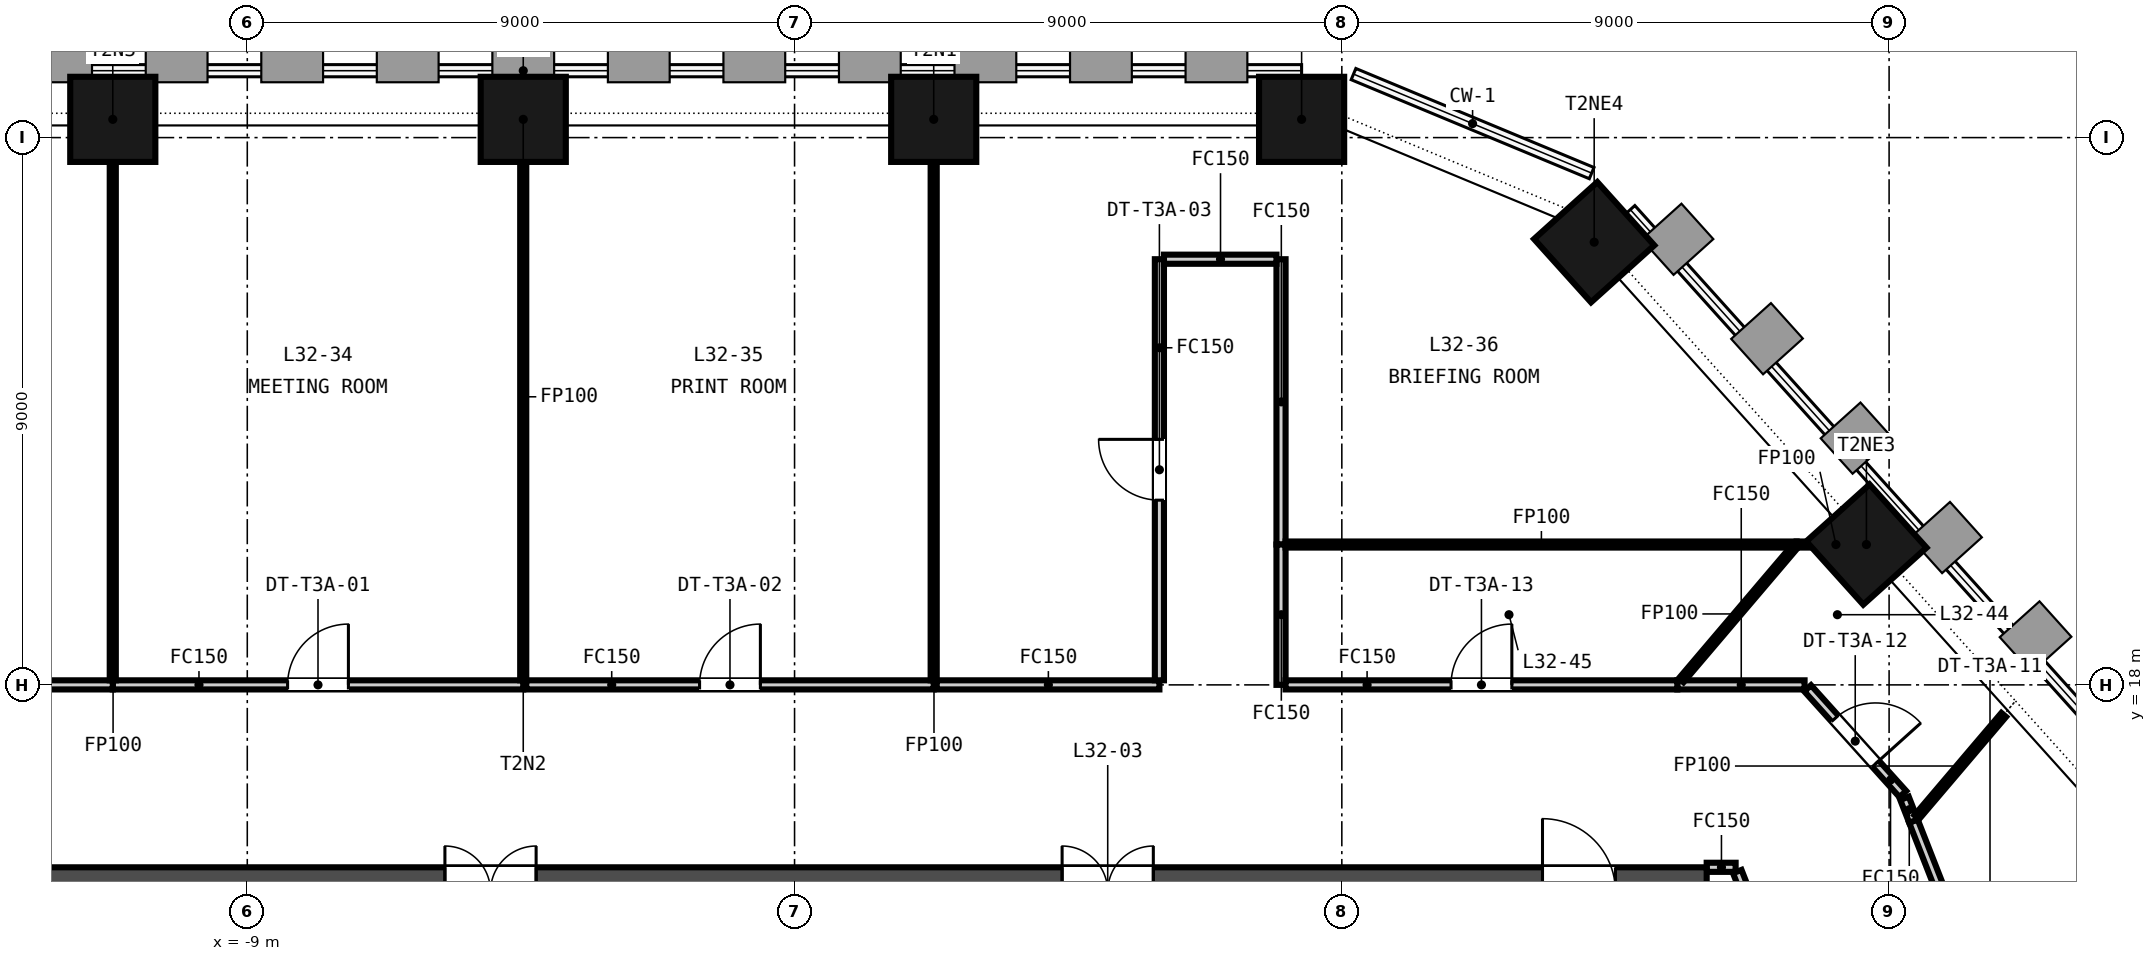
"""IFC4 building model, lengths in metres.
Left out: names, types, materials, properties, quantities, classifications, styles, units other than length and angle.
Written with IfcOpenShell. Run it as: python <this file> out.ifc"""

import sys

from ifc_helpers import new_model, si_unit, direction, frame, frame_2d, origin, origin_2d, place, context, subcontext, project, spatial, rectangle, extrude, element, fill, save


model = new_model("IFC4")
c1 = context("Model", 3, precision=1e-05, world=origin(), true_north=direction((0.0, 1.0)))
c2 = subcontext(c1, "Body", "Model", "MODEL_VIEW")
j1 = project(units=[si_unit("LENGTHUNIT", "METRE"), si_unit("PLANEANGLEUNIT", "RADIAN")], contexts=[c1])
p1 = place(None, origin())
s1 = spatial("IfcSite", under=j1, at=p1, CompositionType="ELEMENT")
p2 = place(p1, origin())
s2 = spatial("IfcBuilding", under=s1, at=p2, CompositionType="ELEMENT")
p3 = place(p2, frame((0.0, 0.0, 133.45)))
s3 = spatial("IfcBuildingStorey", under=s2, at=p3, CompositionType="ELEMENT", Elevation=133.45)
p4 = place(p3, frame((-15.0, 14.6, -0.15), z_axis=(0.0, 0.0, 1.0), x_axis=(1.0, 0.0, 0.0)))
e1 = element("IfcWall", 1, at=p4, inside=s3, PredefinedType="SOLIDWALL", context=c2, shape_type="SweptSolid", body=[
    extrude(rectangle(XDim=30.0, YDim=0.8, at=frame_2d((15.0, 0.0))), origin(), (0.0, 0.0, 1.0), 3.65),
])
p5 = place(p4, frame((9.25, 0.0, 0.15)))
e2 = element("IfcOpeningElement", 2, at=p5, cuts=e1, PredefinedType="OPENING", context=c2, shape_type="SweptSolid", body=[
    extrude(rectangle(XDim=1.5, YDim=2.1, at=frame_2d((0.75, 1.05))), frame((0.0, 0.41, 0.0), z_axis=(0.0, -1.0, 0.0), x_axis=(1.0, 0.0, 0.0)), (0.0, 0.0, 1.0), 0.82),
])
p6 = place(p4, frame((19.4, 0.0, 0.15)))
e3 = element("IfcOpeningElement", 3, at=p6, cuts=e1, PredefinedType="OPENING", context=c2, shape_type="SweptSolid", body=[
    extrude(rectangle(XDim=1.5, YDim=2.1, at=frame_2d((0.75, 1.05))), frame((0.0, 0.41, 0.0), z_axis=(0.0, -1.0, 0.0), x_axis=(1.0, 0.0, 0.0)), (0.0, 0.0, 1.0), 0.82),
])
p7 = place(p4, frame((1.5, 0.0, 0.15)))
e4 = element("IfcOpeningElement", 4, at=p7, cuts=e1, PredefinedType="OPENING", context=c2, shape_type="SweptSolid", body=[
    extrude(rectangle(XDim=1.2, YDim=2.1, at=frame_2d((0.6, 1.05))), frame((0.0, 0.41, 0.0), z_axis=(0.0, -1.0, 0.0), x_axis=(1.0, 0.0, 0.0)), (0.0, 0.0, 1.0), 0.82),
])
p8 = place(p4, frame((27.3, 0.0, 0.15)))
e5 = element("IfcOpeningElement", 5, at=p8, cuts=e1, PredefinedType="OPENING", context=c2, shape_type="SweptSolid", body=[
    extrude(rectangle(XDim=1.2, YDim=2.1, at=frame_2d((0.6, 1.05))), frame((0.0, 0.41, 0.0), z_axis=(0.0, -1.0, 0.0), x_axis=(1.0, 0.0, 0.0)), (0.0, 0.0, 1.0), 0.82),
])
for number, where, z_axis, x_axis in (
    (6, (8.339, 27.3, -0.15), (0.0, 0.0, 1.0), (-1.0, 0.0, 0.0)),
    (7, (2.288, 27.3, -0.15), (0.0, 0.0, 1.0), (-1.0, 0.0, 0.0)),
    (8, (-4.462, 27.3, -0.15), (0.0, 0.0, 1.0), (-1.0, 0.0, 0.0)),
    (9, (-11.212, 27.3, -0.15), (0.0, 0.0, 1.0), (-1.0, 0.0, 0.0)),
    (10, (17.627, 20.308, -0.15), (0.0, 0.0, 1.0), (-0.669, 0.743, 0.0)),
    (11, (13.15, 25.28, -0.15), (0.0, 0.0, 1.0), (-0.669, 0.743, 0.0)),
):
    element("IfcColumn", number, at=place(p3, frame(where, z_axis=z_axis, x_axis=x_axis)), inside=s3, PredefinedType="COLUMN", context=c2, shape_type="SweptSolid", body=[
        extrude(rectangle(XDim=1.4, YDim=1.4, at=origin_2d()), origin(), (0.0, 0.0, 1.0), 3.65),
    ])
p9 = place(p3, frame((8.0, 25.0, 0.0), z_axis=(0.0, 0.0, 1.0), x_axis=(0.0, -1.0, 0.0)))
e12 = element("IfcWall", 12, at=p9, inside=s3, PredefinedType="PARTITIONING", context=c2, shape_type="SweptSolid", body=[
    extrude(rectangle(XDim=4.692, YDim=0.15, at=frame_2d((2.346, 0.0))), origin(), (0.0, 0.0, 1.0), 2.741),
])
p10 = place(p3, frame((15.476, 15.0, 0.0), z_axis=(0.0, 0.0, 1.0), x_axis=(-1.0, 0.0, 0.0)))
e13 = element("IfcWall", 13, at=p10, inside=s3, PredefinedType="PARTITIONING", context=c2, shape_type="SweptSolid", body=[
    extrude(rectangle(XDim=0.476, YDim=0.15, at=frame_2d((0.238, 0.0))), origin(), (0.0, 0.0, 1.0), 2.741),
])
p11 = place(p3, frame((19.5, 4.717, 0.0), z_axis=(0.0, 0.0, 1.0), x_axis=(-0.364410260026, 0.931238509936, 0.0)))
e14 = element("IfcWall", 14, at=p11, inside=s3, PredefinedType="PARTITIONING", context=c2, shape_type="SweptSolid", body=[
    extrude(rectangle(XDim=10.967, YDim=0.15, at=frame_2d((5.484, 0.0))), origin(), (0.0, 0.0, 1.0), 2.741),
])
p12 = place(p11, frame((4.984, 0.0, 0.0)))
e15 = element("IfcOpeningElement", 15, at=p12, cuts=e14, PredefinedType="OPENING", context=c2, shape_type="SweptSolid", body=[
    extrude(rectangle(XDim=1.0, YDim=2.1, at=frame_2d((0.5, 1.05))), frame((0.0, 0.085, 0.0), z_axis=(0.0, -1.0, 0.0), x_axis=(1.0, 0.0, 0.0)), (0.0, 0.0, 1.0), 0.17),
])
p13 = place(p3, frame((8.0, 20.308, 0.0), z_axis=(0.0, 0.0, 1.0), x_axis=(0.0, -1.0, 0.0)))
e16 = element("IfcWall", 16, at=p13, inside=s3, PredefinedType="PARTITIONING", context=c2, shape_type="SweptSolid", body=[
    extrude(rectangle(XDim=2.308, YDim=0.15, at=frame_2d((1.154, 0.0))), origin(), (0.0, 0.0, 1.0), 2.741),
])
p14 = place(p3, frame((-11.212, 18.0, 0.0), z_axis=(0.0, 0.0, 1.0), x_axis=(1.0, 0.0, 0.0)))
e17 = element("IfcWall", 17, at=p14, inside=s3, PredefinedType="PARTITIONING", context=c2, shape_type="SweptSolid", body=[
    extrude(rectangle(XDim=6.75, YDim=0.15, at=frame_2d((3.375, 0.0))), origin(), (0.0, 0.0, 1.0), 2.741),
])
p15 = place(p14, frame((2.875, 0.0, 0.0)))
e18 = element("IfcOpeningElement", 18, at=p15, cuts=e17, PredefinedType="OPENING", context=c2, shape_type="SweptSolid", body=[
    extrude(rectangle(XDim=1.0, YDim=2.1, at=frame_2d((0.5, 1.05))), frame((0.0, 0.085, 0.0), z_axis=(0.0, -1.0, 0.0), x_axis=(1.0, 0.0, 0.0)), (0.0, 0.0, 1.0), 0.17),
])
p16 = place(p3, frame((-4.462, 18.075, 0.0), z_axis=(0.0, 0.0, 1.0), x_axis=(0.0, 1.0, 0.0)))
e19 = element("IfcWall", 19, at=p16, inside=s3, PredefinedType="PARTITIONING", context=c2, shape_type="SweptSolid", body=[
    extrude(rectangle(XDim=9.325, YDim=0.1, at=frame_2d((4.663, 0.0))), origin(), (0.0, 0.0, 1.0), 2.741),
])
p17 = place(p3, frame((-4.412, 18.0, 0.0), z_axis=(0.0, 0.0, 1.0), x_axis=(1.0, 0.0, 0.0)))
e20 = element("IfcWall", 20, at=p17, inside=s3, PredefinedType="PARTITIONING", context=c2, shape_type="SweptSolid", body=[
    extrude(rectangle(XDim=6.7, YDim=0.15, at=frame_2d((3.35, 0.0))), origin(), (0.0, 0.0, 1.0), 2.741),
])
p18 = place(p17, frame((2.85, 0.0, 0.0)))
e21 = element("IfcOpeningElement", 21, at=p18, cuts=e20, PredefinedType="OPENING", context=c2, shape_type="SweptSolid", body=[
    extrude(rectangle(XDim=1.0, YDim=2.1, at=frame_2d((0.5, 1.05))), frame((0.0, 0.085, 0.0), z_axis=(0.0, -1.0, 0.0), x_axis=(1.0, 0.0, 0.0)), (0.0, 0.0, 1.0), 0.17),
])
p19 = place(p3, frame((2.288, 18.075, 0.0), z_axis=(0.0, 0.0, 1.0), x_axis=(0.0, 1.0, 0.0)))
e22 = element("IfcWall", 22, at=p19, inside=s3, PredefinedType="PARTITIONING", context=c2, shape_type="SweptSolid", body=[
    extrude(rectangle(XDim=9.325, YDim=0.1, at=frame_2d((4.663, 0.0))), origin(), (0.0, 0.0, 1.0), 2.741),
])
p20 = place(p3, frame((2.338, 18.0, 0.0), z_axis=(0.0, 0.0, 1.0), x_axis=(1.0, 0.0, 0.0)))
e23 = element("IfcWall", 23, at=p20, inside=s3, PredefinedType="PARTITIONING", context=c2, shape_type="SweptSolid", body=[
    extrude(rectangle(XDim=3.662, YDim=0.15, at=frame_2d((1.831, 0.0))), origin(), (0.0, 0.0, 1.0), 2.741),
])
p21 = place(p3, frame((6.0, 18.075, 0.0), z_axis=(0.0, 0.0, 1.0), x_axis=(0.0, 1.0, 0.0)))
e24 = element("IfcWall", 24, at=p21, inside=s3, PredefinedType="PARTITIONING", context=c2, shape_type="SweptSolid", body=[
    extrude(rectangle(XDim=6.925, YDim=0.15, at=frame_2d((3.462, 0.0))), origin(), (0.0, 0.0, 1.0), 2.741),
])
p22 = place(p21, frame((2.962, 0.0, 0.0)))
e25 = element("IfcOpeningElement", 25, at=p22, cuts=e24, PredefinedType="OPENING", context=c2, shape_type="SweptSolid", body=[
    extrude(rectangle(XDim=1.0, YDim=2.1, at=frame_2d((0.5, 1.05))), frame((0.0, 0.085, 0.0), z_axis=(0.0, -1.0, 0.0), x_axis=(1.0, 0.0, 0.0)), (0.0, 0.0, 1.0), 0.17),
])
p23 = place(p3, frame((6.075, 25.0, 0.0), z_axis=(0.0, 0.0, 1.0), x_axis=(1.0, 0.0, 0.0)))
e26 = element("IfcWall", 26, at=p23, inside=s3, PredefinedType="PARTITIONING", context=c2, shape_type="SweptSolid", body=[
    extrude(rectangle(XDim=1.85, YDim=0.15, at=frame_2d((0.925, 0.0))), origin(), (0.0, 0.0, 1.0), 2.741),
])
p24 = place(p3, frame((16.479, 20.308, 0.0), z_axis=(0.0, 0.0, 1.0), x_axis=(1.0, 0.0, 0.0)))
e27 = element("IfcWall", 27, at=p24, inside=s3, PredefinedType="PARTITIONING", context=c2, shape_type="SweptSolid", body=[
    extrude(rectangle(XDim=1.283, YDim=0.1, at=frame_2d((0.642, 0.0))), origin(), (0.0, 0.0, 1.0), 2.741),
])
p25 = place(p3, frame((8.075, 20.308, 0.0), z_axis=(0.0, 0.0, 1.0), x_axis=(1.0, 0.0, 0.0)))
e28 = element("IfcWall", 28, at=p25, inside=s3, PredefinedType="PARTITIONING", context=c2, shape_type="SweptSolid", body=[
    extrude(rectangle(XDim=8.404, YDim=0.1, at=frame_2d((4.202, 0.0))), origin(), (0.0, 0.0, 1.0), 2.741),
])
p26 = place(p3, frame((-17.449, 18.0, 0.0), z_axis=(0.0, 0.0, 1.0), x_axis=(1.0, 0.0, 0.0)))
e29 = element("IfcWall", 29, at=p26, inside=s3, PredefinedType="PARTITIONING", context=c2, shape_type="SweptSolid", body=[
    extrude(rectangle(XDim=6.237, YDim=0.15, at=frame_2d((3.119, 0.0))), origin(), (0.0, 0.0, 1.0), 2.741),
])
p27 = place(p3, frame((-11.212, 18.075, 0.0), z_axis=(0.0, 0.0, 1.0), x_axis=(0.0, 1.0, 0.0)))
e30 = element("IfcWall", 30, at=p27, inside=s3, PredefinedType="PARTITIONING", context=c2, shape_type="SweptSolid", body=[
    extrude(rectangle(XDim=9.325, YDim=0.1, at=frame_2d((4.663, 0.0))), origin(), (0.0, 0.0, 1.0), 2.741),
])
p28 = place(p3, frame((18.4, 15.76, 0.0), z_axis=(0.0, 0.0, 1.0), x_axis=(0.364425982763, -0.931232357195, 0.0)))
e31 = element("IfcWall", 31, at=p28, inside=s3, PredefinedType="PARTITIONING", context=c2, shape_type="SweptSolid", body=[
    extrude(rectangle(XDim=6.912, YDim=0.15, at=frame_2d((3.456, 0.0))), origin(), (0.0, 0.0, 1.0), 2.741),
])
p29 = place(p28, frame((2.956, 0.0, 0.0)))
e32 = element("IfcOpeningElement", 32, at=p29, cuts=e31, PredefinedType="OPENING", context=c2, shape_type="SweptSolid", body=[
    extrude(rectangle(XDim=1.0, YDim=2.1, at=frame_2d((0.5, 1.05))), frame((0.0, 0.085, 0.0), z_axis=(0.0, -1.0, 0.0), x_axis=(1.0, 0.0, 0.0)), (0.0, 0.0, 1.0), 0.17),
])
p30 = place(p3, frame((14.517, 18.0, 0.0), z_axis=(0.0, 0.0, 1.0), x_axis=(1.0, 0.0, 0.0)))
e33 = element("IfcWall", 33, at=p30, inside=s3, PredefinedType="PARTITIONING", context=c2, shape_type="SweptSolid", body=[
    extrude(rectangle(XDim=2.093, YDim=0.15, at=frame_2d((1.046, 0.0))), origin(), (0.0, 0.0, 1.0), 2.741),
])
p31 = place(p3, frame((16.66, 17.944, 0.0), z_axis=(0.0, 0.0, 1.0), x_axis=(0.669103043777, -0.743169642012, 0.0)))
e34 = element("IfcWall", 34, at=p31, inside=s3, PredefinedType="PARTITIONING", context=c2, shape_type="SweptSolid", body=[
    extrude(rectangle(XDim=2.34, YDim=0.15, at=frame_2d((1.17, 0.0))), origin(), (0.0, 0.0, 1.0), 2.741),
])
p32 = place(p31, frame((0.67, 0.0, 0.0)))
e35 = element("IfcOpeningElement", 35, at=p32, cuts=e34, PredefinedType="OPENING", context=c2, shape_type="SweptSolid", body=[
    extrude(rectangle(XDim=1.0, YDim=2.1, at=frame_2d((0.5, 1.05))), frame((0.0, 0.085, 0.0), z_axis=(0.0, -1.0, 0.0), x_axis=(1.0, 0.0, 0.0)), (0.0, 0.0, 1.0), 0.17),
])
p33 = place(p3, frame((18.253, 16.135, 0.0), z_axis=(0.0, 0.0, 1.0), x_axis=(0.36385052714, -0.93145734948, 0.0)))
e36 = element("IfcWall", 36, at=p33, inside=s3, PredefinedType="PARTITIONING", context=c2, shape_type="SweptSolid", body=[
    extrude(rectangle(XDim=0.403, YDim=0.15, at=frame_2d((0.201, 0.0))), origin(), (0.0, 0.0, 1.0), 2.741),
])
p34 = place(p3, frame((18.455, 15.825, 0.0), z_axis=(0.0, 0.0, 1.0), x_axis=(0.647780060511, 0.761827403815, 0.0)))
e37 = element("IfcWall", 37, at=p34, inside=s3, PredefinedType="PARTITIONING", context=c2, shape_type="SweptSolid", body=[
    extrude(rectangle(XDim=2.207, YDim=0.1, at=frame_2d((1.104, 0.0))), origin(), (0.0, 0.0, 1.0), 2.741),
])
p35 = place(p3, frame((8.075, 18.0, 0.0), z_axis=(0.0, 0.0, 1.0), x_axis=(1.0, 0.0, 0.0)))
e38 = element("IfcWall", 38, at=p35, inside=s3, PredefinedType="PARTITIONING", context=c2, shape_type="SweptSolid", body=[
    extrude(rectangle(XDim=6.442, YDim=0.15, at=frame_2d((3.221, 0.0))), origin(), (0.0, 0.0, 1.0), 2.741),
])
p36 = place(p35, frame((2.721, 0.0, 0.0)))
e39 = element("IfcOpeningElement", 39, at=p36, cuts=e38, PredefinedType="OPENING", context=c2, shape_type="SweptSolid", body=[
    extrude(rectangle(XDim=1.0, YDim=2.1, at=frame_2d((0.5, 1.05))), frame((0.0, 0.085, 0.0), z_axis=(0.0, -1.0, 0.0), x_axis=(1.0, 0.0, 0.0)), (0.0, 0.0, 1.0), 0.17),
])
p37 = place(p3, frame((14.581, 18.075, 0.0), z_axis=(0.0, 0.0, 1.0), x_axis=(0.6476632602, 0.761926703422, 0.0)))
e40 = element("IfcWall", 40, at=p37, inside=s3, PredefinedType="PARTITIONING", context=c2, shape_type="SweptSolid", body=[
    extrude(rectangle(XDim=2.865, YDim=0.1, at=frame_2d((1.433, 0.0))), origin(), (0.0, 0.0, 1.0), 2.741),
])
p38 = place(p15, origin())
e41 = element("IfcDoor", 41, at=p38, inside=s3, OperationType="SINGLE_SWING_RIGHT", PredefinedType="DOOR", context=c2, shape_type="SweptSolid", body=[
    extrude(rectangle(XDim=1.0, YDim=2.1, at=frame_2d((0.5, 1.05))), frame((0.0, 0.025, 0.0), z_axis=(0.0, -1.0, 0.0), x_axis=(1.0, 0.0, 0.0)), (0.0, 0.0, 1.0), 0.05),
])
fill(e18, e41)
p39 = place(p18, origin())
e42 = element("IfcDoor", 42, at=p39, inside=s3, OperationType="SINGLE_SWING_RIGHT", PredefinedType="DOOR", context=c2, shape_type="SweptSolid", body=[
    extrude(rectangle(XDim=1.0, YDim=2.1, at=frame_2d((0.5, 1.05))), frame((0.0, 0.025, 0.0), z_axis=(0.0, -1.0, 0.0), x_axis=(1.0, 0.0, 0.0)), (0.0, 0.0, 1.0), 0.05),
])
fill(e21, e42)
p40 = place(p22, origin())
e43 = element("IfcDoor", 43, at=p40, inside=s3, OperationType="SINGLE_SWING_RIGHT", PredefinedType="DOOR", context=c2, shape_type="SweptSolid", body=[
    extrude(rectangle(XDim=1.0, YDim=2.1, at=frame_2d((0.5, 1.05))), frame((0.0, 0.025, 0.0), z_axis=(0.0, -1.0, 0.0), x_axis=(1.0, 0.0, 0.0)), (0.0, 0.0, 1.0), 0.05),
])
fill(e25, e43)
p41 = place(p32, origin())
e44 = element("IfcDoor", 44, at=p41, inside=s3, OperationType="SINGLE_SWING_RIGHT", PredefinedType="DOOR", context=c2, shape_type="SweptSolid", body=[
    extrude(rectangle(XDim=1.0, YDim=2.1, at=frame_2d((0.5, 1.05))), frame((0.0, 0.025, 0.0), z_axis=(0.0, -1.0, 0.0), x_axis=(1.0, 0.0, 0.0)), (0.0, 0.0, 1.0), 0.05),
])
fill(e35, e44)
p42 = place(p36, origin())
e45 = element("IfcDoor", 45, at=p42, inside=s3, OperationType="SINGLE_SWING_RIGHT", PredefinedType="DOOR", context=c2, shape_type="SweptSolid", body=[
    extrude(rectangle(XDim=1.0, YDim=2.1, at=frame_2d((0.5, 1.05))), frame((0.0, 0.025, 0.0), z_axis=(0.0, -1.0, 0.0), x_axis=(1.0, 0.0, 0.0)), (0.0, 0.0, 1.0), 0.05),
])
fill(e39, e45)
save(model, sys.argv[1])
